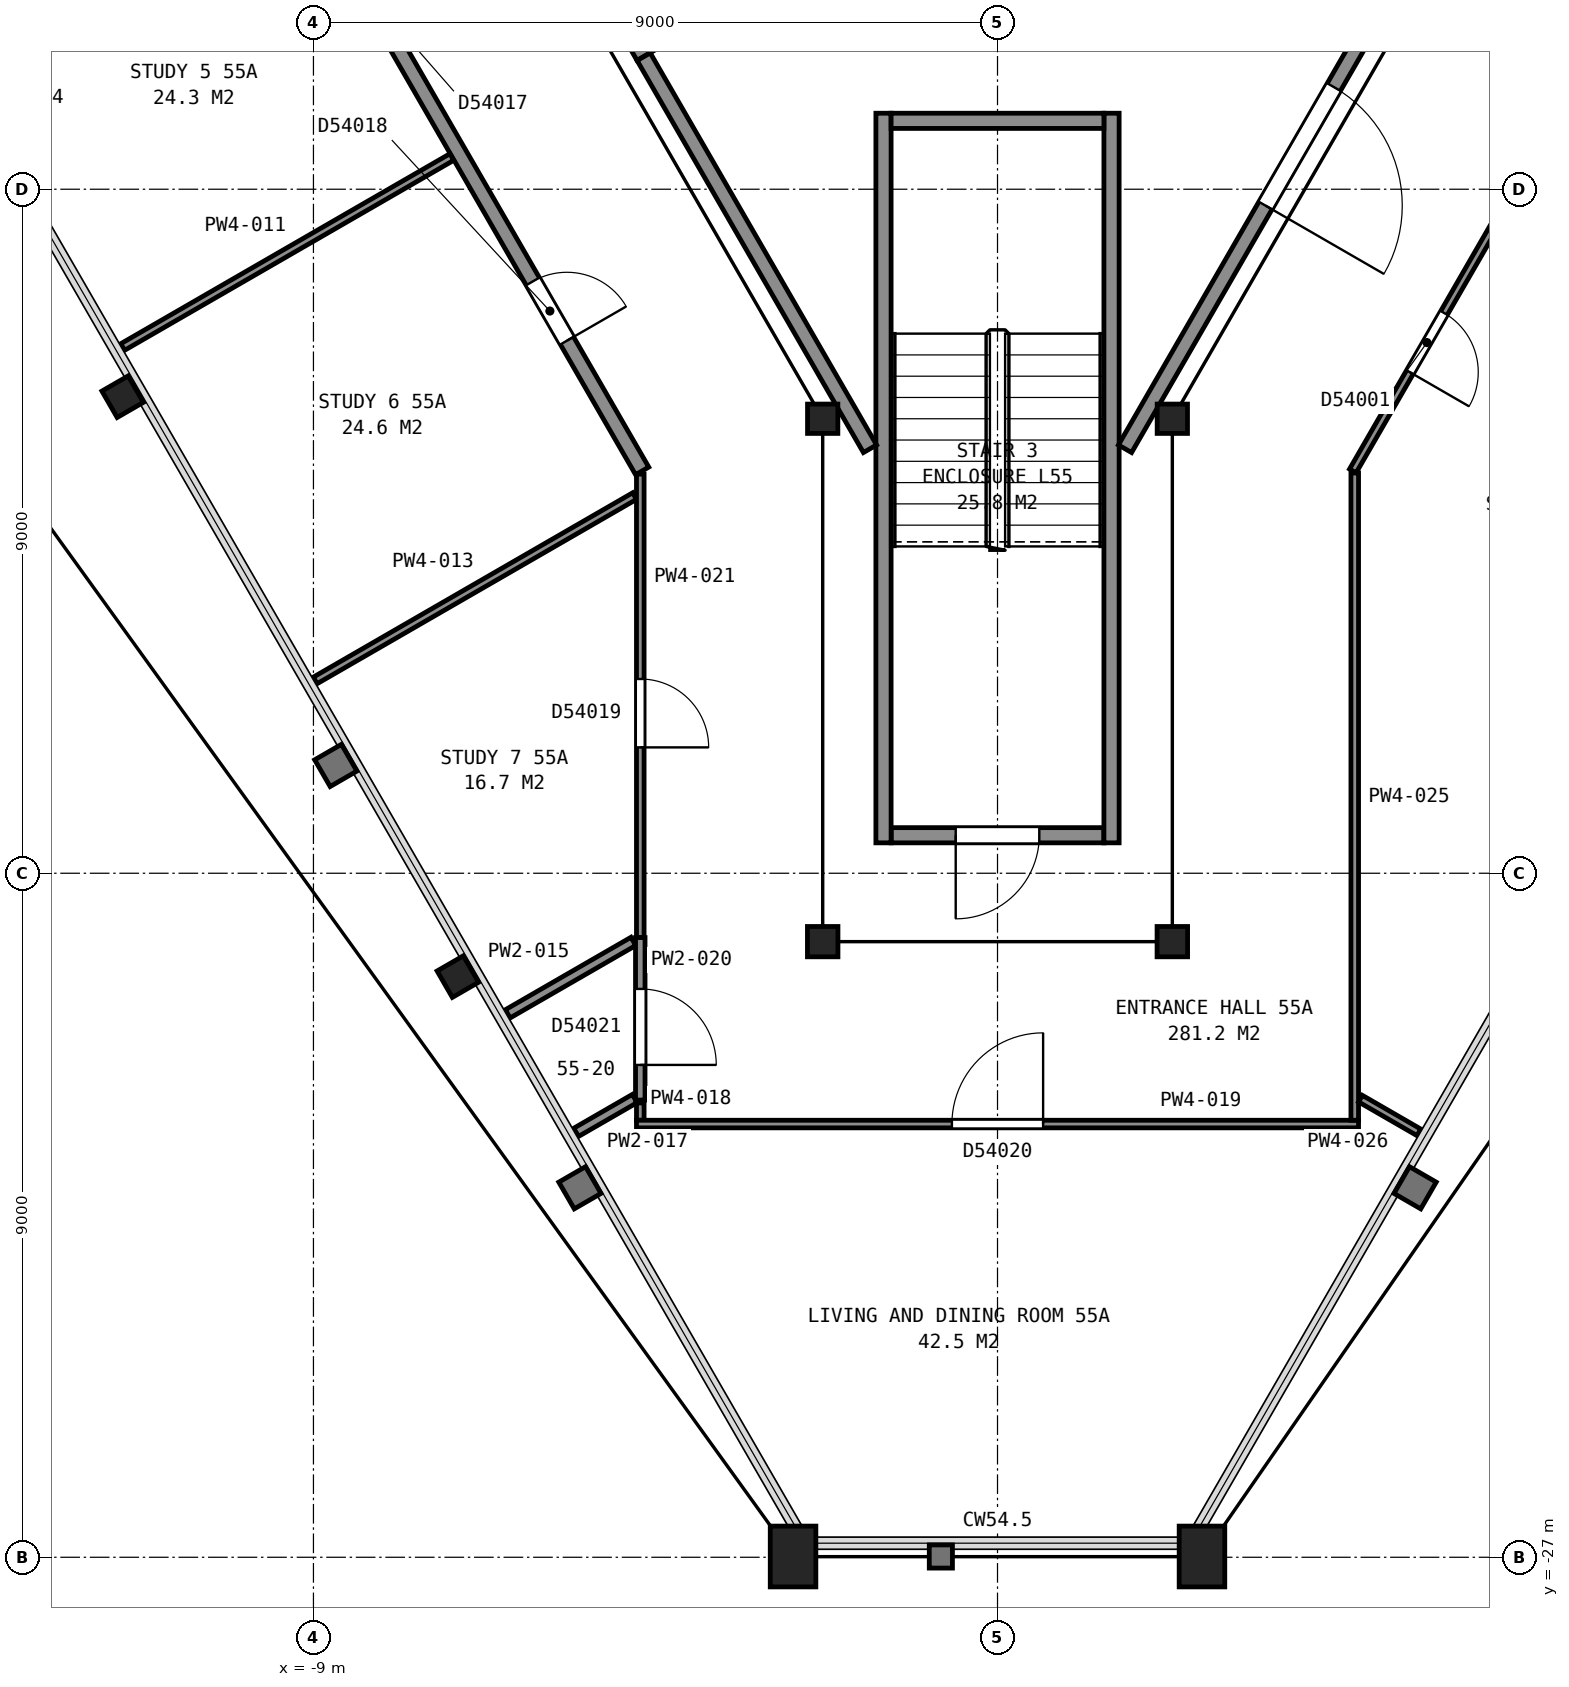
"""IFC4 building model, lengths in metres.
Left out: names, types, materials, properties, quantities, classifications, styles, units other than length and angle.
Written with IfcOpenShell. Run it as: python <this file> out.ifc"""

import sys

from ifc_helpers import new_model, si_unit, direction, frame, frame_2d, origin, origin_2d, place, context, subcontext, project, spatial, rectangle, hollow_rectangle, i_section, extrude, element, fill, save


model = new_model("IFC4")
c1 = context("Model", 3, precision=1e-05, world=origin(), true_north=direction((0.0, 1.0)))
c2 = subcontext(c1, "Body", "Model", "MODEL_VIEW")
j1 = project(units=[si_unit("LENGTHUNIT", "METRE"), si_unit("PLANEANGLEUNIT", "RADIAN")], contexts=[c1])
p1 = place(None, origin())
s1 = spatial("IfcSite", under=j1, at=p1, CompositionType="ELEMENT")
p2 = place(p1, origin())
s2 = spatial("IfcBuilding", under=s1, at=p2, CompositionType="ELEMENT")
p3 = place(p2, frame((0.0, 0.0, 221.2)))
s3 = spatial("IfcBuildingStorey", under=s2, at=p3, CompositionType="ELEMENT", Elevation=221.2)
for number, where, z_axis, x_axis in (
    (1, (-11.51, -11.73, 0.0), (0.0, 0.0, 1.0), (-0.5, 0.866, 0.0)),
    (2, (-7.1, -19.36, 0.0), (0.0, 0.0, 1.0), (-0.5, 0.866, 0.0)),
):
    element("IfcColumn", number, at=place(p3, frame(where, z_axis=z_axis, x_axis=x_axis)), inside=s3, PredefinedType="COLUMN", context=c2, shape_type="SweptSolid", body=[
        extrude(i_section(OverallWidth=0.401, OverallDepth=0.399, WebThickness=0.025, FlangeThickness=0.04, FilletRadius=0.015, at=origin_2d()), origin(), (0.0, 0.0, 1.0), 3.7),
    ])
for number, where, z_axis, x_axis in (
    (3, (-2.69, -26.99, 0.0), (0.0, 0.0, 1.0), (-1.0, 0.0, 0.0)),
    (4, (2.69, -26.99, 0.0), (0.0, 0.0, 1.0), (-1.0, 0.0, 0.0)),
):
    element("IfcColumn", number, at=place(p3, frame(where, z_axis=z_axis, x_axis=x_axis)), inside=s3, PredefinedType="COLUMN", context=c2, shape_type="SweptSolid", body=[
        extrude(hollow_rectangle(XDim=0.6, YDim=0.8, WallThickness=0.05, at=origin_2d()), origin(), (0.0, 0.0, 1.0), 3.7),
    ])
p4 = place(p3, frame((-2.3, -12.02, 0.0), z_axis=(0.0, 0.0, 1.0), x_axis=(1.0, 0.0, 0.0)))
e5 = element("IfcColumn", 5, at=p4, inside=s3, PredefinedType="COLUMN", context=c2, shape_type="SweptSolid", body=[
    extrude(i_section(OverallWidth=0.399, OverallDepth=0.386, WebThickness=0.021, FlangeThickness=0.033, FilletRadius=0.015, at=origin_2d()), origin(), (0.0, 0.0, 1.0), 3.7),
])
for number, where, z_axis, x_axis in (
    (6, (-2.3, -18.9, 0.0), (0.0, 0.0, 1.0), (-1.0, 0.0, 0.0)),
    (7, (2.3, -18.9, 0.0), (0.0, 0.0, 1.0), (-1.0, 0.0, 0.0)),
):
    element("IfcColumn", number, at=place(p3, frame(where, z_axis=z_axis, x_axis=x_axis)), inside=s3, PredefinedType="COLUMN", context=c2, shape_type="SweptSolid", body=[
        extrude(i_section(OverallWidth=0.401, OverallDepth=0.399, WebThickness=0.025, FlangeThickness=0.04, FilletRadius=0.015, at=origin_2d()), origin(), (0.0, 0.0, 1.0), 3.7),
    ])
p5 = place(p3, frame((2.3, -12.02, 0.0), z_axis=(0.0, 0.0, 1.0), x_axis=(1.0, 0.0, 0.0)))
e8 = element("IfcColumn", 8, at=p5, inside=s3, PredefinedType="COLUMN", context=c2, shape_type="SweptSolid", body=[
    extrude(i_section(OverallWidth=0.399, OverallDepth=0.386, WebThickness=0.021, FlangeThickness=0.033, FilletRadius=0.015, at=origin_2d()), origin(), (0.0, 0.0, 1.0), 3.7),
])
p6 = place(p3, frame((-1.4, -17.5, 0.0), z_axis=(0.0, 0.0, 1.0), x_axis=(1.0, 0.0, 0.0)))
e9 = element("IfcWall", 9, at=p6, inside=s3, PredefinedType="PARTITIONING", context=c2, shape_type="SweptSolid", body=[
    extrude(rectangle(XDim=2.8, YDim=0.2, at=frame_2d((1.4, 0.0))), origin(), (0.0, 0.0, 1.0), 3.45),
])
p7 = place(p6, frame((0.85, 0.0, 0.0)))
e10 = element("IfcOpeningElement", 10, at=p7, cuts=e9, PredefinedType="OPENING", context=c2, shape_type="SweptSolid", body=[
    extrude(rectangle(XDim=1.1, YDim=2.1, at=frame_2d((0.55, 1.05))), frame((0.0, 0.11, 0.0), z_axis=(0.0, -1.0, 0.0), x_axis=(1.0, 0.0, 0.0)), (0.0, 0.0, 1.0), 0.22),
])
for number, where, z_axis, x_axis in (
    (11, (1.5, -8.0, 0.0), (0.0, 0.0, 1.0), (0.0, -1.0, 0.0)),
    (12, (-1.5, -8.0, 0.0), (0.0, 0.0, 1.0), (0.0, -1.0, 0.0)),
):
    element("IfcWall", number, at=place(p3, frame(where, z_axis=z_axis, x_axis=x_axis)), inside=s3, PredefinedType="PARTITIONING", context=c2, shape_type="SweptSolid", body=[
        extrude(rectangle(XDim=9.6, YDim=0.2, at=frame_2d((4.8, 0.0))), origin(), (0.0, 0.0, 1.0), 3.45),
    ])
p8 = place(p3, frame((-1.4, -8.1, 0.0), z_axis=(0.0, 0.0, 1.0), x_axis=(1.0, 0.0, 0.0)))
e13 = element("IfcWall", 13, at=p8, inside=s3, PredefinedType="PARTITIONING", context=c2, shape_type="SweptSolid", body=[
    extrude(rectangle(XDim=2.8, YDim=0.2, at=frame_2d((1.4, 0.0))), origin(), (0.0, 0.0, 1.0), 3.45),
])
p9 = place(p3, frame((-4.62, -7.118, 0.0), z_axis=(0.0, 0.0, 1.0), x_axis=(0.866036909293, 0.499980071345, 0.0)))
e14 = element("IfcWall", 14, at=p9, inside=s3, PredefinedType="PARTITIONING", context=c2, shape_type="SweptSolid", body=[
    extrude(rectangle(XDim=1.75, YDim=0.2, at=frame_2d((0.875, 0.0))), origin(), (0.0, 0.0, 1.0), 3.7),
])
p10 = place(p3, frame((-4.656, -7.255, 0.0), z_axis=(0.0, 0.0, 1.0), x_axis=(-0.499990435942, 0.866030925526, 0.0)))
e15 = element("IfcWall", 15, at=p10, inside=s3, PredefinedType="PARTITIONING", context=c2, shape_type="SweptSolid", body=[
    extrude(rectangle(XDim=2.55, YDim=0.2, at=frame_2d((1.275, 0.0))), origin(), (0.0, 0.0, 1.0), 3.7),
])
p11 = place(p3, frame((-4.655, -7.257, 0.0), z_axis=(0.0, 0.0, 1.0), x_axis=(0.499966124405, -0.866044960985, 0.0)))
e16 = element("IfcWall", 16, at=p11, inside=s3, PredefinedType="PARTITIONING", context=c2, shape_type="SweptSolid", body=[
    extrude(rectangle(XDim=5.956, YDim=0.2, at=frame_2d((2.978, 0.0))), origin(), (0.0, 0.0, 1.0), 3.45),
])
p12 = place(p3, frame((1.677, -12.415, 0.0), z_axis=(0.0, 0.0, 1.0), x_axis=(0.500054337157, 0.865994029939, 0.0)))
e17 = element("IfcWall", 17, at=p12, inside=s3, PredefinedType="PARTITIONING", context=c2, shape_type="SweptSolid", body=[
    extrude(rectangle(XDim=6.177, YDim=0.2, at=frame_2d((3.088, 0.0))), origin(), (0.0, 0.0, 1.0), 3.45),
])
p13 = place(p12, frame((3.695, 0.0, 0.0)))
e18 = element("IfcOpeningElement", 18, at=p13, cuts=e17, PredefinedType="OPENING", context=c2, shape_type="SweptSolid", body=[
    extrude(rectangle(XDim=1.8, YDim=2.1, at=frame_2d((0.9, 1.05))), frame((0.0, 0.11, 0.0), z_axis=(0.0, -1.0, 0.0), x_axis=(1.0, 0.0, 0.0)), (0.0, 0.0, 1.0), 0.22),
])
p14 = place(p3, frame((-4.675, -12.706, 0.0), z_axis=(0.0, 0.0, 1.0), x_axis=(-0.49997440863, 0.866040178465, 0.0)))
e19 = element("IfcWall", 19, at=p14, inside=s3, PredefinedType="PARTITIONING", context=c2, shape_type="SweptSolid", body=[
    extrude(rectangle(XDim=17.335, YDim=0.2, at=frame_2d((8.667, 0.0))), origin(), (0.0, 0.0, 1.0), 2.713),
])
p15 = place(p14, frame((14.185, 0.0, 0.0)))
e20 = element("IfcOpeningElement", 20, at=p15, cuts=e19, PredefinedType="OPENING", context=c2, shape_type="SweptSolid", body=[
    extrude(rectangle(XDim=0.9, YDim=2.1, at=frame_2d((0.45, 1.05))), frame((0.0, 0.11, 0.0), z_axis=(0.0, -1.0, 0.0), x_axis=(1.0, 0.0, 0.0)), (0.0, 0.0, 1.0), 0.22),
])
p16 = place(p14, frame((6.895, 0.0, 0.0)))
e21 = element("IfcOpeningElement", 21, at=p16, cuts=e19, PredefinedType="OPENING", context=c2, shape_type="SweptSolid", body=[
    extrude(rectangle(XDim=0.9, YDim=2.1, at=frame_2d((0.45, 1.05))), frame((0.0, 0.11, 0.0), z_axis=(0.0, -1.0, 0.0), x_axis=(1.0, 0.0, 0.0)), (0.0, 0.0, 1.0), 0.22),
])
p17 = place(p14, frame((1.979, 0.0, 0.0)))
e22 = element("IfcOpeningElement", 22, at=p17, cuts=e19, PredefinedType="OPENING", context=c2, shape_type="SweptSolid", body=[
    extrude(rectangle(XDim=0.9, YDim=2.1, at=frame_2d((0.45, 1.05))), frame((0.0, 0.11, 0.0), z_axis=(0.0, -1.0, 0.0), x_axis=(1.0, 0.0, 0.0)), (0.0, 0.0, 1.0), 0.22),
])
p18 = place(p3, frame((-11.51, -11.076, 0.0), z_axis=(0.0, 0.0, 1.0), x_axis=(0.866053039883, 0.499952129818, 0.0)))
e23 = element("IfcWall", 23, at=p18, inside=s3, PredefinedType="PARTITIONING", context=c2, shape_type="SweptSolid", body=[
    extrude(rectangle(XDim=5.0, YDim=0.1, at=frame_2d((2.5, 0.0))), origin(), (0.0, 0.0, 1.0), 2.713),
])
p19 = place(p3, frame((-8.977, -15.463, 0.0), z_axis=(0.0, 0.0, 1.0), x_axis=(0.866042300147, 0.4999707335, 0.0)))
e24 = element("IfcWall", 24, at=p19, inside=s3, PredefinedType="PARTITIONING", context=c2, shape_type="SweptSolid", body=[
    extrude(rectangle(XDim=4.852, YDim=0.1, at=frame_2d((2.426, 0.0))), origin(), (0.0, 0.0, 1.0), 2.713),
])
p20 = place(p3, frame((-6.444, -19.85, 0.0), z_axis=(0.0, 0.0, 1.0), x_axis=(0.866172805685, 0.499744605466, 0.0)))
e25 = element("IfcWall", 25, at=p20, inside=s3, PredefinedType="PARTITIONING", context=c2, shape_type="SweptSolid", body=[
    extrude(rectangle(XDim=1.908, YDim=0.125, at=frame_2d((0.954, 0.0))), origin(), (0.0, 0.0, 1.0), 2.713),
])
p21 = place(p3, frame((-5.544, -21.409, 0.0), z_axis=(0.0, 0.0, 1.0), x_axis=(0.866089597041, 0.499888797531, 0.0)))
e26 = element("IfcWall", 26, at=p21, inside=s3, PredefinedType="PARTITIONING", context=c2, shape_type="SweptSolid", body=[
    extrude(rectangle(XDim=0.889, YDim=0.125, at=frame_2d((0.445, 0.0))), origin(), (0.0, 0.0, 1.0), 2.713),
])
p22 = place(p3, frame((-4.7, -21.25, 0.0), z_axis=(0.0, 0.0, 1.0), x_axis=(0.0, 1.0, 0.0)))
e27 = element("IfcWall", 27, at=p22, inside=s3, PredefinedType="PARTITIONING", context=c2, shape_type="SweptSolid", body=[
    extrude(rectangle(XDim=0.228, YDim=0.1, at=frame_2d((0.114, 0.0))), origin(), (0.0, 0.0, 1.0), 2.713),
])
p23 = place(p3, frame((4.75, -21.3, 0.0), z_axis=(0.0, 0.0, 1.0), x_axis=(-1.0, 0.0, 0.0)))
e28 = element("IfcWall", 28, at=p23, inside=s3, PredefinedType="PARTITIONING", context=c2, shape_type="SweptSolid", body=[
    extrude(rectangle(XDim=9.5, YDim=0.1, at=frame_2d((4.75, 0.0))), origin(), (0.0, 0.0, 1.0), 2.713),
])
p24 = place(p23, frame((4.15, 0.0, 0.0)))
e29 = element("IfcOpeningElement", 29, at=p24, cuts=e28, PredefinedType="OPENING", context=c2, shape_type="SweptSolid", body=[
    extrude(rectangle(XDim=1.2, YDim=2.1, at=frame_2d((0.6, 1.05))), frame((0.0, 0.06, 0.0), z_axis=(0.0, -1.0, 0.0), x_axis=(1.0, 0.0, 0.0)), (0.0, 0.0, 1.0), 0.12),
])
p25 = place(p3, frame((-4.7, -18.846, 0.0), z_axis=(0.0, 0.0, 1.0), x_axis=(0.0, -1.0, 0.0)))
e30 = element("IfcWall", 30, at=p25, inside=s3, PredefinedType="PARTITIONING", context=c2, shape_type="SweptSolid", body=[
    extrude(rectangle(XDim=2.138, YDim=0.125, at=frame_2d((1.069, 0.0))), origin(), (0.0, 0.0, 1.0), 2.713),
])
p26 = place(p25, frame((0.676, 0.0, 0.0)))
e31 = element("IfcOpeningElement", 31, at=p26, cuts=e30, PredefinedType="OPENING", context=c2, shape_type="SweptSolid", body=[
    extrude(rectangle(XDim=1.0, YDim=2.1, at=frame_2d((0.5, 1.05))), frame((0.0, 0.073, 0.0), z_axis=(0.0, -1.0, 0.0), x_axis=(1.0, 0.0, 0.0)), (0.0, 0.0, 1.0), 0.145),
])
p27 = place(p3, frame((-4.7, -18.844, 0.0), z_axis=(0.0, 0.0, 1.0), x_axis=(0.0, 1.0, 0.0)))
e32 = element("IfcWall", 32, at=p27, inside=s3, PredefinedType="PARTITIONING", context=c2, shape_type="SweptSolid", body=[
    extrude(rectangle(XDim=6.096, YDim=0.1, at=frame_2d((3.048, 0.0))), origin(), (0.0, 0.0, 1.0), 2.713),
])
p28 = place(p27, frame((2.5, 0.0, 0.0)))
e33 = element("IfcOpeningElement", 33, at=p28, cuts=e32, PredefinedType="OPENING", context=c2, shape_type="SweptSolid", body=[
    extrude(rectangle(XDim=0.9, YDim=2.1, at=frame_2d((0.45, 1.05))), frame((0.0, 0.06, 0.0), z_axis=(0.0, -1.0, 0.0), x_axis=(1.0, 0.0, 0.0)), (0.0, 0.0, 1.0), 0.12),
])
p29 = place(p3, frame((4.7, -21.25, 0.0), z_axis=(0.0, 0.0, 1.0), x_axis=(0.0, 1.0, 0.0)))
e34 = element("IfcWall", 34, at=p29, inside=s3, PredefinedType="PARTITIONING", context=c2, shape_type="SweptSolid", body=[
    extrude(rectangle(XDim=8.517, YDim=0.1, at=frame_2d((4.259, 0.0))), origin(), (0.0, 0.0, 1.0), 2.713),
])
p30 = place(p3, frame((4.775, -20.965, 0.0), z_axis=(0.0, 0.0, 1.0), x_axis=(0.866103179807, -0.499865263774, 0.0)))
e35 = element("IfcWall", 35, at=p30, inside=s3, PredefinedType="PARTITIONING", context=c2, shape_type="SweptSolid", body=[
    extrude(rectangle(XDim=0.888, YDim=0.1, at=frame_2d((0.444, 0.0))), origin(), (0.0, 0.0, 1.0), 2.713),
])
p31 = place(p3, frame((13.342, 2.306, 0.0), z_axis=(0.0, 0.0, 1.0), x_axis=(-0.49997440863, -0.866040178465, 0.0)))
e36 = element("IfcWall", 36, at=p31, inside=s3, PredefinedType="PARTITIONING", context=c2, shape_type="SweptSolid", body=[
    extrude(rectangle(XDim=17.335, YDim=0.1, at=frame_2d((8.667, 0.0))), origin(), (0.0, 0.0, 1.0), 2.713),
])
p32 = place(p31, frame((14.935, 0.0, 0.0)))
e37 = element("IfcOpeningElement", 37, at=p32, cuts=e36, PredefinedType="OPENING", context=c2, shape_type="SweptSolid", body=[
    extrude(rectangle(XDim=0.9, YDim=2.1, at=frame_2d((0.45, 1.05))), frame((0.0, 0.06, 0.0), z_axis=(0.0, -1.0, 0.0), x_axis=(1.0, 0.0, 0.0)), (0.0, 0.0, 1.0), 0.12),
])
p33 = place(p31, frame((10.794, 0.0, 0.0)))
e38 = element("IfcOpeningElement", 38, at=p33, cuts=e36, PredefinedType="OPENING", context=c2, shape_type="SweptSolid", body=[
    extrude(rectangle(XDim=0.9, YDim=2.1, at=frame_2d((0.45, 1.05))), frame((0.0, 0.06, 0.0), z_axis=(0.0, -1.0, 0.0), x_axis=(1.0, 0.0, 0.0)), (0.0, 0.0, 1.0), 0.12),
])
p34 = place(p31, frame((5.866, 0.0, 0.0)))
e39 = element("IfcOpeningElement", 39, at=p34, cuts=e36, PredefinedType="OPENING", context=c2, shape_type="SweptSolid", body=[
    extrude(rectangle(XDim=0.9, YDim=2.1, at=frame_2d((0.45, 1.05))), frame((0.0, 0.06, 0.0), z_axis=(0.0, -1.0, 0.0), x_axis=(1.0, 0.0, 0.0)), (0.0, 0.0, 1.0), 0.12),
])
p35 = place(p31, frame((1.395, 0.0, 0.0)))
e40 = element("IfcOpeningElement", 40, at=p35, cuts=e36, PredefinedType="OPENING", context=c2, shape_type="SweptSolid", body=[
    extrude(rectangle(XDim=0.9, YDim=2.1, at=frame_2d((0.45, 1.05))), frame((0.0, 0.06, 0.0), z_axis=(0.0, -1.0, 0.0), x_axis=(1.0, 0.0, 0.0)), (0.0, 0.0, 1.0), 0.12),
])
p36 = place(p7, origin())
e41 = element("IfcDoor", 41, at=p36, inside=s3, OperationType="SINGLE_SWING_LEFT", PredefinedType="DOOR", context=c2, shape_type="SweptSolid", body=[
    extrude(rectangle(XDim=1.1, YDim=2.1, at=frame_2d((0.55, 1.05))), frame((0.0, 0.025, 0.0), z_axis=(0.0, -1.0, 0.0), x_axis=(1.0, 0.0, 0.0)), (0.0, 0.0, 1.0), 0.05),
])
fill(e10, e41)
p37 = place(p13, origin())
e42 = element("IfcDoor", 42, at=p37, inside=s3, OperationType="DOUBLE_DOOR_SINGLE_SWING", PredefinedType="DOOR", context=c2, shape_type="SweptSolid", body=[
    extrude(rectangle(XDim=1.8, YDim=2.1, at=frame_2d((0.9, 1.05))), frame((0.0, 0.025, 0.0), z_axis=(0.0, -1.0, 0.0), x_axis=(1.0, 0.0, 0.0)), (0.0, 0.0, 1.0), 0.05),
])
fill(e18, e42)
p38 = place(p17, origin())
e43 = element("IfcDoor", 43, at=p38, inside=s3, OperationType="SINGLE_SWING_LEFT", PredefinedType="DOOR", context=c2, shape_type="SweptSolid", body=[
    extrude(rectangle(XDim=0.9, YDim=2.1, at=frame_2d((0.45, 1.05))), frame((0.0, 0.025, 0.0), z_axis=(0.0, -1.0, 0.0), x_axis=(1.0, 0.0, 0.0)), (0.0, 0.0, 1.0), 0.05),
])
fill(e22, e43)
p39 = place(p24, origin())
e44 = element("IfcDoor", 44, at=p39, inside=s3, OperationType="SINGLE_SWING_LEFT", PredefinedType="DOOR", context=c2, shape_type="SweptSolid", body=[
    extrude(rectangle(XDim=1.2, YDim=2.1, at=frame_2d((0.6, 1.05))), frame((0.0, 0.025, 0.0), z_axis=(0.0, -1.0, 0.0), x_axis=(1.0, 0.0, 0.0)), (0.0, 0.0, 1.0), 0.05),
])
fill(e29, e44)
p40 = place(p26, origin())
e45 = element("IfcDoor", 45, at=p40, inside=s3, OperationType="SINGLE_SWING_RIGHT", PredefinedType="DOOR", context=c2, shape_type="SweptSolid", body=[
    extrude(rectangle(XDim=1.0, YDim=2.1, at=frame_2d((0.5, 1.05))), frame((0.0, 0.025, 0.0), z_axis=(0.0, -1.0, 0.0), x_axis=(1.0, 0.0, 0.0)), (0.0, 0.0, 1.0), 0.05),
])
fill(e31, e45)
p41 = place(p28, origin())
e46 = element("IfcDoor", 46, at=p41, inside=s3, OperationType="SINGLE_SWING_LEFT", PredefinedType="DOOR", context=c2, shape_type="SweptSolid", body=[
    extrude(rectangle(XDim=0.9, YDim=2.1, at=frame_2d((0.45, 1.05))), frame((0.0, 0.025, 0.0), z_axis=(0.0, -1.0, 0.0), x_axis=(1.0, 0.0, 0.0)), (0.0, 0.0, 1.0), 0.05),
])
fill(e33, e46)
p42 = place(p32, origin())
e47 = element("IfcDoor", 47, at=p42, inside=s3, OperationType="SINGLE_SWING_RIGHT", PredefinedType="DOOR", context=c2, shape_type="SweptSolid", body=[
    extrude(rectangle(XDim=0.9, YDim=2.1, at=frame_2d((0.45, 1.05))), frame((0.0, 0.025, 0.0), z_axis=(0.0, -1.0, 0.0), x_axis=(1.0, 0.0, 0.0)), (0.0, 0.0, 1.0), 0.05),
])
fill(e37, e47)
save(model, sys.argv[1])
